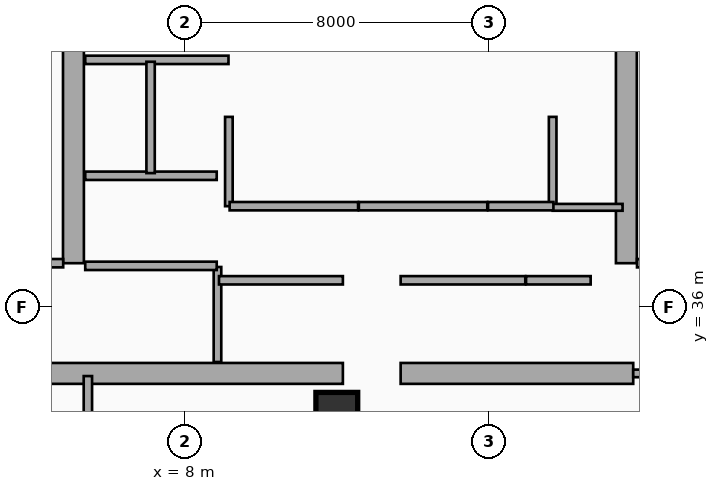
"""IFC4 building model, lengths in metres.
Left out: names, types, materials, properties, quantities, classifications, styles, units other than length and angle.
Written with IfcOpenShell. Run it as: python <this file> out.ifc"""

import sys

from ifc_helpers import new_model, si_unit, direction, frame, frame_2d, origin, origin_2d, place, context, subcontext, project, spatial, rectangle, extrude, element, fill, save


model = new_model("IFC4")
c1 = context("Model", 3, precision=1e-05, world=origin(), true_north=direction((0.0, 1.0)))
c2 = subcontext(c1, "Body", "Model", "MODEL_VIEW")
j1 = project(units=[si_unit("LENGTHUNIT", "METRE"), si_unit("PLANEANGLEUNIT", "RADIAN")], contexts=[c1])
p1 = place(None, origin())
s1 = spatial("IfcSite", under=j1, at=p1, CompositionType="ELEMENT")
p2 = place(p1, origin())
s2 = spatial("IfcBuilding", under=s1, at=p2, CompositionType="ELEMENT")
p3 = place(p2, origin())
s3 = spatial("IfcBuildingStorey", under=s2, at=p3, CompositionType="ELEMENT", Elevation=0.0)
p4 = place(p3, frame((1.45, 34.25, 0.0), z_axis=(0.0, 0.0, 1.0), x_axis=(1.0, 0.0, 0.0)))
e1 = element("IfcWall", 1, at=p4, inside=s3, PredefinedType="SHEAR", context=c2, shape_type="SweptSolid", body=[
    extrude(rectangle(XDim=10.71, YDim=0.55, at=frame_2d((5.355, 0.0))), origin(), (0.0, 0.0, 1.0), 5.94),
])
p5 = place(p4, frame((7.25, 0.0, 0.0), z_axis=(0.0, 0.0, 1.0), x_axis=(-1.0, 0.0, 0.0)))
e2 = element("IfcOpeningElement", 2, at=p5, cuts=e1, PredefinedType="OPENING", context=c2, shape_type="SweptSolid", body=[
    extrude(rectangle(XDim=1.1, YDim=2.15, at=frame_2d((0.55, 1.075))), frame((0.0, 0.285, 0.0), z_axis=(0.0, -1.0, 0.0), x_axis=(1.0, 0.0, 0.0)), (0.0, 0.0, 1.0), 0.57),
])
p6 = place(p3, frame((13.68, 34.25, 0.0), z_axis=(0.0, 0.0, 1.0), x_axis=(1.0, 0.0, 0.0)))
e3 = element("IfcWall", 3, at=p6, inside=s3, PredefinedType="SHEAR", context=c2, shape_type="SweptSolid", body=[
    extrude(rectangle(XDim=6.12, YDim=0.55, at=frame_2d((3.06, 0.0))), origin(), (0.0, 0.0, 1.0), 5.94),
])
for number, where, z_axis, x_axis in (
    (4, (5.07, 37.15, 0.0), (0.0, 0.0, 1.0), (0.0, 1.0, 0.0)),
    (5, (19.62, 37.15, 0.0), (0.0, 0.0, 1.0), (0.0, 1.0, 0.0)),
):
    element("IfcWall", number, at=place(p3, frame(where, z_axis=z_axis, x_axis=x_axis)), inside=s3, PredefinedType="SHEAR", context=c2, shape_type="SweptSolid", body=[
        extrude(rectangle(XDim=7.89, YDim=0.55, at=frame_2d((3.945, 0.0))), origin(), (0.0, 0.0, 1.0), 5.94),
    ])
p7 = place(p3, frame((12.0, 33.2, 0.0), z_axis=(0.0, 0.0, 1.0), x_axis=(1.0, 0.0, 0.0)))
e6 = element("IfcColumn", 6, at=p7, inside=s3, PredefinedType="COLUMN", context=c2, shape_type="SweptSolid", body=[
    extrude(rectangle(XDim=1.1, YDim=1.1, at=origin_2d()), origin(), (0.0, 0.0, 1.0), 5.94),
])
p8 = place(p3, frame((1.65, 37.15, 0.0), z_axis=(0.0, 0.0, 1.0), x_axis=(1.0, 0.0, 0.0)))
e7 = element("IfcWall", 7, at=p8, inside=s3, PredefinedType="PARTITIONING", context=c2, shape_type="SweptSolid", body=[
    extrude(rectangle(XDim=3.15, YDim=0.22, at=frame_2d((1.575, 0.0))), origin(), (0.0, 0.0, 1.0), 5.62),
])
p9 = place(p8, frame((2.05, 0.0, 0.0), z_axis=(0.0, 0.0, 1.0), x_axis=(-1.0, 0.0, 0.0)))
e8 = element("IfcOpeningElement", 8, at=p9, cuts=e7, PredefinedType="OPENING", context=c2, shape_type="SweptSolid", body=[
    extrude(rectangle(XDim=1.05, YDim=2.15, at=frame_2d((0.525, 1.075))), frame((0.0, 0.12, 0.0), z_axis=(0.0, -1.0, 0.0), x_axis=(1.0, 0.0, 0.0)), (0.0, 0.0, 1.0), 0.24),
])
p10 = place(p3, frame((8.86, 34.55, 0.0), z_axis=(0.0, 0.0, 1.0), x_axis=(0.0, 1.0, 0.0)))
e9 = element("IfcWall", 9, at=p10, inside=s3, PredefinedType="PARTITIONING", context=c2, shape_type="SweptSolid", body=[
    extrude(rectangle(XDim=2.5, YDim=0.2, at=frame_2d((1.25, 0.0))), origin(), (0.0, 0.0, 1.0), 5.62),
])
p11 = place(p3, frame((19.9, 37.15, 0.0), z_axis=(0.0, 0.0, 1.0), x_axis=(1.0, 0.0, 0.0)))
e10 = element("IfcWall", 10, at=p11, inside=s3, PredefinedType="PARTITIONING", context=c2, shape_type="SweptSolid", body=[
    extrude(rectangle(XDim=3.15, YDim=0.22, at=frame_2d((1.575, 0.0))), origin(), (0.0, 0.0, 1.0), 5.62),
])
p12 = place(p11, frame((2.05, 0.0, 0.0), z_axis=(0.0, 0.0, 1.0), x_axis=(-1.0, 0.0, 0.0)))
e11 = element("IfcOpeningElement", 11, at=p12, cuts=e10, PredefinedType="OPENING", context=c2, shape_type="SweptSolid", body=[
    extrude(rectangle(XDim=1.05, YDim=2.15, at=frame_2d((0.525, 1.075))), frame((0.0, 0.12, 0.0), z_axis=(0.0, -1.0, 0.0), x_axis=(1.0, 0.0, 0.0)), (0.0, 0.0, 1.0), 0.24),
])
p13 = place(p3, frame((19.8, 34.25, 0.0), z_axis=(0.0, 0.0, 1.0), x_axis=(1.0, 0.0, 0.0)))
e12 = element("IfcWall", 12, at=p13, inside=s3, PredefinedType="PARTITIONING", context=c2, shape_type="SweptSolid", body=[
    extrude(rectangle(XDim=3.25, YDim=0.2, at=frame_2d((1.625, 0.0))), origin(), (0.0, 0.0, 1.0), 5.62),
])
p14 = place(p13, frame((2.15, 0.0, 0.0), z_axis=(0.0, 0.0, 1.0), x_axis=(-1.0, 0.0, 0.0)))
e13 = element("IfcOpeningElement", 13, at=p14, cuts=e12, PredefinedType="OPENING", context=c2, shape_type="SweptSolid", body=[
    extrude(rectangle(XDim=1.1, YDim=2.15, at=frame_2d((0.55, 1.075))), frame((0.0, 0.11, 0.0), z_axis=(0.0, -1.0, 0.0), x_axis=(1.0, 0.0, 0.0)), (0.0, 0.0, 1.0), 0.22),
])
p15 = place(p3, frame((5.38, 37.08, 0.0), z_axis=(0.0, 0.0, 1.0), x_axis=(1.0, 0.0, 0.0)))
e14 = element("IfcWall", 14, at=p15, inside=s3, PredefinedType="PARTITIONING", context=c2, shape_type="SweptSolid", body=[
    extrude(rectangle(XDim=3.46, YDim=0.22, at=frame_2d((1.73, 0.0))), origin(), (0.0, 0.0, 1.0), 5.62),
])
p16 = place(p15, frame((1.55, 0.0, 0.0), z_axis=(0.0, 0.0, 1.0), x_axis=(-1.0, 0.0, 0.0)))
e15 = element("IfcOpeningElement", 15, at=p16, cuts=e14, PredefinedType="OPENING", context=c2, shape_type="SweptSolid", body=[
    extrude(rectangle(XDim=1.2, YDim=2.2, at=frame_2d((0.6, 1.1))), frame((0.0, 0.12, 0.0), z_axis=(0.0, -1.0, 0.0), x_axis=(1.0, 0.0, 0.0)), (0.0, 0.0, 1.0), 0.24),
])
p17 = place(p15, frame((3.22, 0.0, 0.0), z_axis=(0.0, 0.0, 1.0), x_axis=(-1.0, 0.0, 0.0)))
e16 = element("IfcOpeningElement", 16, at=p17, cuts=e14, PredefinedType="OPENING", context=c2, shape_type="SweptSolid", body=[
    extrude(rectangle(XDim=1.2, YDim=2.2, at=frame_2d((0.6, 1.1))), frame((0.0, 0.12, 0.0), z_axis=(0.0, -1.0, 0.0), x_axis=(1.0, 0.0, 0.0)), (0.0, 0.0, 1.0), 0.24),
])
p18 = place(p3, frame((5.38, 39.45, 0.0), z_axis=(0.0, 0.0, 1.0), x_axis=(1.0, 0.0, 0.0)))
e17 = element("IfcWall", 17, at=p18, inside=s3, PredefinedType="PARTITIONING", context=c2, shape_type="SweptSolid", body=[
    extrude(rectangle(XDim=3.46, YDim=0.22, at=frame_2d((1.73, 0.0))), origin(), (0.0, 0.0, 1.0), 5.62),
])
p19 = place(p3, frame((5.38, 42.5, 0.0), z_axis=(0.0, 0.0, 1.0), x_axis=(1.0, 0.0, 0.0)))
e18 = element("IfcWall", 18, at=p19, inside=s3, PredefinedType="PARTITIONING", context=c2, shape_type="SweptSolid", body=[
    extrude(rectangle(XDim=3.77, YDim=0.22, at=frame_2d((1.885, 0.0))), origin(), (0.0, 0.0, 1.0), 5.62),
])
p20 = place(p19, frame((1.75, 0.0, 0.0), z_axis=(0.0, 0.0, 1.0), x_axis=(-1.0, 0.0, 0.0)))
e19 = element("IfcOpeningElement", 19, at=p20, cuts=e18, PredefinedType="OPENING", context=c2, shape_type="SweptSolid", body=[
    extrude(rectangle(XDim=1.4, YDim=2.2, at=frame_2d((0.7, 1.1))), frame((0.0, 0.12, 0.0), z_axis=(0.0, -1.0, 0.0), x_axis=(1.0, 0.0, 0.0)), (0.0, 0.0, 1.0), 0.24),
])
p21 = place(p19, frame((3.53, 0.0, 0.0), z_axis=(0.0, 0.0, 1.0), x_axis=(-1.0, 0.0, 0.0)))
e20 = element("IfcOpeningElement", 20, at=p21, cuts=e18, PredefinedType="OPENING", context=c2, shape_type="SweptSolid", body=[
    extrude(rectangle(XDim=1.4, YDim=2.2, at=frame_2d((0.7, 1.1))), frame((0.0, 0.12, 0.0), z_axis=(0.0, -1.0, 0.0), x_axis=(1.0, 0.0, 0.0)), (0.0, 0.0, 1.0), 0.24),
])
p22 = place(p3, frame((7.1, 39.52, 0.0), z_axis=(0.0, 0.0, 1.0), x_axis=(0.0, 1.0, 0.0)))
e21 = element("IfcWall", 21, at=p22, inside=s3, PredefinedType="PARTITIONING", context=c2, shape_type="SweptSolid", body=[
    extrude(rectangle(XDim=2.93, YDim=0.22, at=frame_2d((1.465, 0.0))), origin(), (0.0, 0.0, 1.0), 5.62),
])
p23 = place(p22, frame((0.85, 0.0, 0.0)))
e22 = element("IfcOpeningElement", 22, at=p23, cuts=e21, PredefinedType="OPENING", context=c2, shape_type="SweptSolid", body=[
    extrude(rectangle(XDim=1.1, YDim=2.2, at=frame_2d((0.55, 1.1))), frame((0.0, 0.12, 0.0), z_axis=(0.0, -1.0, 0.0), x_axis=(1.0, 0.0, 0.0)), (0.0, 0.0, 1.0), 0.24),
])
p24 = place(p3, frame((5.45, 31.8, 0.0), z_axis=(0.0, 0.0, 1.0), x_axis=(0.0, 1.0, 0.0)))
e23 = element("IfcWall", 23, at=p24, inside=s3, PredefinedType="PARTITIONING", context=c2, shape_type="SweptSolid", body=[
    extrude(rectangle(XDim=2.38, YDim=0.22, at=frame_2d((1.19, 0.0))), origin(), (0.0, 0.0, 1.0), 5.62),
])
for number, where, z_axis, x_axis in (
    (24, (9.16, 38.65, 0.0), (0.0, 0.0, 1.0), (0.0, 1.0, 0.0)),
    (25, (17.68, 38.65, 0.0), (0.0, 0.0, 1.0), (0.0, 1.0, 0.0)),
):
    element("IfcWall", number, at=place(p3, frame(where, z_axis=z_axis, x_axis=x_axis)), inside=s3, PredefinedType="PARTITIONING", context=c2, shape_type="SweptSolid", body=[
        extrude(rectangle(XDim=2.35, YDim=0.2, at=frame_2d((1.175, 0.0))), origin(), (0.0, 0.0, 1.0), 5.62),
    ])
p25 = place(p3, frame((17.68, 38.62, 0.0), z_axis=(0.0, 0.0, 1.0), x_axis=(1.0, 0.0, 0.0)))
e26 = element("IfcWall", 26, at=p25, inside=s3, PredefinedType="PARTITIONING", context=c2, shape_type="SweptSolid", body=[
    extrude(rectangle(XDim=1.84, YDim=0.18, at=frame_2d((0.92, 0.0))), origin(), (0.0, 0.0, 1.0), 5.62),
])
p26 = place(p25, frame((0.24, 0.0, 0.0)))
e27 = element("IfcOpeningElement", 27, at=p26, cuts=e26, PredefinedType="OPENING", context=c2, shape_type="SweptSolid", body=[
    extrude(rectangle(XDim=0.92, YDim=2.1, at=frame_2d((0.46, 1.05))), frame((0.0, 0.1, 0.0), z_axis=(0.0, -1.0, 0.0), x_axis=(1.0, 0.0, 0.0)), (0.0, 0.0, 1.0), 0.2),
])
p27 = place(p3, frame((8.9, 36.7, 0.0), z_axis=(0.0, 0.0, 1.0), x_axis=(1.0, 0.0, 0.0)))
e28 = element("IfcWall", 28, at=p27, inside=s3, PredefinedType="PARTITIONING", context=c2, shape_type="SweptSolid", body=[
    extrude(rectangle(XDim=3.26, YDim=0.22, at=frame_2d((1.63, 0.0))), origin(), (0.0, 0.0, 1.0), 5.62),
])
p28 = place(p27, frame((0.26, 0.0, 0.0)))
e29 = element("IfcOpeningElement", 29, at=p28, cuts=e28, PredefinedType="OPENING", context=c2, shape_type="SweptSolid", body=[
    extrude(rectangle(XDim=1.1, YDim=2.2, at=frame_2d((0.55, 1.1))), frame((0.0, 0.12, 0.0), z_axis=(0.0, -1.0, 0.0), x_axis=(1.0, 0.0, 0.0)), (0.0, 0.0, 1.0), 0.24),
])
p29 = place(p27, frame((1.88, 0.0, 0.0)))
e30 = element("IfcOpeningElement", 30, at=p29, cuts=e28, PredefinedType="OPENING", context=c2, shape_type="SweptSolid", body=[
    extrude(rectangle(XDim=1.1, YDim=2.2, at=frame_2d((0.55, 1.1))), frame((0.0, 0.12, 0.0), z_axis=(0.0, -1.0, 0.0), x_axis=(1.0, 0.0, 0.0)), (0.0, 0.0, 1.0), 0.24),
])
p30 = place(p3, frame((9.18, 38.65, 0.0), z_axis=(0.0, 0.0, 1.0), x_axis=(1.0, 0.0, 0.0)))
e31 = element("IfcWall", 31, at=p30, inside=s3, PredefinedType="PARTITIONING", context=c2, shape_type="SweptSolid", body=[
    extrude(rectangle(XDim=3.38, YDim=0.22, at=frame_2d((1.69, 0.0))), origin(), (0.0, 0.0, 1.0), 5.62),
])
p31 = place(p30, frame((0.3, 0.0, 0.0)))
e32 = element("IfcOpeningElement", 32, at=p31, cuts=e31, PredefinedType="OPENING", context=c2, shape_type="SweptSolid", body=[
    extrude(rectangle(XDim=1.1, YDim=2.2, at=frame_2d((0.55, 1.1))), frame((0.0, 0.12, 0.0), z_axis=(0.0, -1.0, 0.0), x_axis=(1.0, 0.0, 0.0)), (0.0, 0.0, 1.0), 0.24),
])
p32 = place(p30, frame((1.95, 0.0, 0.0)))
e33 = element("IfcOpeningElement", 33, at=p32, cuts=e31, PredefinedType="OPENING", context=c2, shape_type="SweptSolid", body=[
    extrude(rectangle(XDim=1.1, YDim=2.2, at=frame_2d((0.55, 1.1))), frame((0.0, 0.12, 0.0), z_axis=(0.0, -1.0, 0.0), x_axis=(1.0, 0.0, 0.0)), (0.0, 0.0, 1.0), 0.24),
])
p33 = place(p3, frame((13.68, 36.7, 0.0), z_axis=(0.0, 0.0, 1.0), x_axis=(1.0, 0.0, 0.0)))
e34 = element("IfcWall", 34, at=p33, inside=s3, PredefinedType="PARTITIONING", context=c2, shape_type="SweptSolid", body=[
    extrude(rectangle(XDim=3.28, YDim=0.22, at=frame_2d((1.64, 0.0))), origin(), (0.0, 0.0, 1.0), 5.62),
])
p34 = place(p33, frame((0.28, 0.0, 0.0)))
e35 = element("IfcOpeningElement", 35, at=p34, cuts=e34, PredefinedType="OPENING", context=c2, shape_type="SweptSolid", body=[
    extrude(rectangle(XDim=1.1, YDim=2.2, at=frame_2d((0.55, 1.1))), frame((0.0, 0.12, 0.0), z_axis=(0.0, -1.0, 0.0), x_axis=(1.0, 0.0, 0.0)), (0.0, 0.0, 1.0), 0.24),
])
p35 = place(p33, frame((1.9, 0.0, 0.0)))
e36 = element("IfcOpeningElement", 36, at=p35, cuts=e34, PredefinedType="OPENING", context=c2, shape_type="SweptSolid", body=[
    extrude(rectangle(XDim=1.1, YDim=2.2, at=frame_2d((0.55, 1.1))), frame((0.0, 0.12, 0.0), z_axis=(0.0, -1.0, 0.0), x_axis=(1.0, 0.0, 0.0)), (0.0, 0.0, 1.0), 0.24),
])
p36 = place(p3, frame((12.58, 38.65, 0.0), z_axis=(0.0, 0.0, 1.0), x_axis=(1.0, 0.0, 0.0)))
e37 = element("IfcWall", 37, at=p36, inside=s3, PredefinedType="PARTITIONING", context=c2, shape_type="SweptSolid", body=[
    extrude(rectangle(XDim=3.38, YDim=0.22, at=frame_2d((1.69, 0.0))), origin(), (0.0, 0.0, 1.0), 5.62),
])
p37 = place(p36, frame((0.3, 0.0, 0.0)))
e38 = element("IfcOpeningElement", 38, at=p37, cuts=e37, PredefinedType="OPENING", context=c2, shape_type="SweptSolid", body=[
    extrude(rectangle(XDim=1.1, YDim=2.2, at=frame_2d((0.55, 1.1))), frame((0.0, 0.12, 0.0), z_axis=(0.0, -1.0, 0.0), x_axis=(1.0, 0.0, 0.0)), (0.0, 0.0, 1.0), 0.24),
])
p38 = place(p36, frame((1.95, 0.0, 0.0)))
e39 = element("IfcOpeningElement", 39, at=p38, cuts=e37, PredefinedType="OPENING", context=c2, shape_type="SweptSolid", body=[
    extrude(rectangle(XDim=1.1, YDim=2.2, at=frame_2d((0.55, 1.1))), frame((0.0, 0.12, 0.0), z_axis=(0.0, -1.0, 0.0), x_axis=(1.0, 0.0, 0.0)), (0.0, 0.0, 1.0), 0.24),
])
p39 = place(p3, frame((16.98, 36.7, 0.0), z_axis=(0.0, 0.0, 1.0), x_axis=(1.0, 0.0, 0.0)))
e40 = element("IfcWall", 40, at=p39, inside=s3, PredefinedType="PARTITIONING", context=c2, shape_type="SweptSolid", body=[
    extrude(rectangle(XDim=1.7, YDim=0.22, at=frame_2d((0.85, 0.0))), origin(), (0.0, 0.0, 1.0), 5.62),
])
p40 = place(p39, frame((0.3, 0.0, 0.0)))
e41 = element("IfcOpeningElement", 41, at=p40, cuts=e40, PredefinedType="OPENING", context=c2, shape_type="SweptSolid", body=[
    extrude(rectangle(XDim=1.1, YDim=2.2, at=frame_2d((0.55, 1.1))), frame((0.0, 0.12, 0.0), z_axis=(0.0, -1.0, 0.0), x_axis=(1.0, 0.0, 0.0)), (0.0, 0.0, 1.0), 0.24),
])
p41 = place(p3, frame((15.98, 38.65, 0.0), z_axis=(0.0, 0.0, 1.0), x_axis=(1.0, 0.0, 0.0)))
e42 = element("IfcWall", 42, at=p41, inside=s3, PredefinedType="PARTITIONING", context=c2, shape_type="SweptSolid", body=[
    extrude(rectangle(XDim=1.72, YDim=0.22, at=frame_2d((0.86, 0.0))), origin(), (0.0, 0.0, 1.0), 5.62),
])
p42 = place(p41, frame((0.3, 0.0, 0.0)))
e43 = element("IfcOpeningElement", 43, at=p42, cuts=e42, PredefinedType="OPENING", context=c2, shape_type="SweptSolid", body=[
    extrude(rectangle(XDim=1.1, YDim=2.2, at=frame_2d((0.55, 1.1))), frame((0.0, 0.12, 0.0), z_axis=(0.0, -1.0, 0.0), x_axis=(1.0, 0.0, 0.0)), (0.0, 0.0, 1.0), 0.24),
])
p43 = place(p5, origin())
e44 = element("IfcDoor", 44, at=p43, inside=s3, OperationType="SINGLE_SWING_LEFT", PredefinedType="DOOR", context=c2, shape_type="SweptSolid", body=[
    extrude(rectangle(XDim=1.1, YDim=2.15, at=frame_2d((0.55, 1.075))), frame((0.0, 0.025, 0.0), z_axis=(0.0, -1.0, 0.0), x_axis=(1.0, 0.0, 0.0)), (0.0, 0.0, 1.0), 0.05),
])
fill(e2, e44)
p44 = place(p16, origin())
e45 = element("IfcDoor", 45, at=p44, inside=s3, OperationType="SLIDING_TO_RIGHT", PredefinedType="DOOR", context=c2, shape_type="SweptSolid", body=[
    extrude(rectangle(XDim=1.2, YDim=2.2, at=frame_2d((0.6, 1.1))), frame((0.0, 0.025, 0.0), z_axis=(0.0, -1.0, 0.0), x_axis=(1.0, 0.0, 0.0)), (0.0, 0.0, 1.0), 0.05),
])
fill(e15, e45)
p45 = place(p17, origin())
e46 = element("IfcDoor", 46, at=p45, inside=s3, OperationType="SLIDING_TO_RIGHT", PredefinedType="DOOR", context=c2, shape_type="SweptSolid", body=[
    extrude(rectangle(XDim=1.2, YDim=2.2, at=frame_2d((0.6, 1.1))), frame((0.0, 0.025, 0.0), z_axis=(0.0, -1.0, 0.0), x_axis=(1.0, 0.0, 0.0)), (0.0, 0.0, 1.0), 0.05),
])
fill(e16, e46)
p46 = place(p20, origin())
e47 = element("IfcDoor", 47, at=p46, inside=s3, OperationType="SLIDING_TO_LEFT", PredefinedType="DOOR", context=c2, shape_type="SweptSolid", body=[
    extrude(rectangle(XDim=1.4, YDim=2.2, at=frame_2d((0.7, 1.1))), frame((0.0, 0.025, 0.0), z_axis=(0.0, -1.0, 0.0), x_axis=(1.0, 0.0, 0.0)), (0.0, 0.0, 1.0), 0.05),
])
fill(e19, e47)
p47 = place(p21, origin())
e48 = element("IfcDoor", 48, at=p47, inside=s3, OperationType="SLIDING_TO_LEFT", PredefinedType="DOOR", context=c2, shape_type="SweptSolid", body=[
    extrude(rectangle(XDim=1.4, YDim=2.2, at=frame_2d((0.7, 1.1))), frame((0.0, 0.025, 0.0), z_axis=(0.0, -1.0, 0.0), x_axis=(1.0, 0.0, 0.0)), (0.0, 0.0, 1.0), 0.05),
])
fill(e20, e48)
p48 = place(p23, origin())
e49 = element("IfcDoor", 49, at=p48, inside=s3, OperationType="SLIDING_TO_LEFT", PredefinedType="DOOR", context=c2, shape_type="SweptSolid", body=[
    extrude(rectangle(XDim=1.1, YDim=2.2, at=frame_2d((0.55, 1.1))), frame((0.0, 0.025, 0.0), z_axis=(0.0, -1.0, 0.0), x_axis=(1.0, 0.0, 0.0)), (0.0, 0.0, 1.0), 0.05),
])
fill(e22, e49)
p49 = place(p26, origin())
e50 = element("IfcDoor", 50, at=p49, inside=s3, OperationType="SINGLE_SWING_RIGHT", PredefinedType="DOOR", context=c2, shape_type="SweptSolid", body=[
    extrude(rectangle(XDim=0.92, YDim=2.1, at=frame_2d((0.46, 1.05))), frame((0.0, 0.025, 0.0), z_axis=(0.0, -1.0, 0.0), x_axis=(1.0, 0.0, 0.0)), (0.0, 0.0, 1.0), 0.05),
])
fill(e27, e50)
p50 = place(p28, origin())
e51 = element("IfcDoor", 51, at=p50, inside=s3, OperationType="SLIDING_TO_LEFT", PredefinedType="DOOR", context=c2, shape_type="SweptSolid", body=[
    extrude(rectangle(XDim=1.1, YDim=2.2, at=frame_2d((0.55, 1.1))), frame((0.0, 0.025, 0.0), z_axis=(0.0, -1.0, 0.0), x_axis=(1.0, 0.0, 0.0)), (0.0, 0.0, 1.0), 0.05),
])
fill(e29, e51)
p51 = place(p29, origin())
e52 = element("IfcDoor", 52, at=p51, inside=s3, OperationType="SLIDING_TO_LEFT", PredefinedType="DOOR", context=c2, shape_type="SweptSolid", body=[
    extrude(rectangle(XDim=1.1, YDim=2.2, at=frame_2d((0.55, 1.1))), frame((0.0, 0.025, 0.0), z_axis=(0.0, -1.0, 0.0), x_axis=(1.0, 0.0, 0.0)), (0.0, 0.0, 1.0), 0.05),
])
fill(e30, e52)
p52 = place(p31, origin())
e53 = element("IfcDoor", 53, at=p52, inside=s3, OperationType="SLIDING_TO_LEFT", PredefinedType="DOOR", context=c2, shape_type="SweptSolid", body=[
    extrude(rectangle(XDim=1.1, YDim=2.2, at=frame_2d((0.55, 1.1))), frame((0.0, 0.025, 0.0), z_axis=(0.0, -1.0, 0.0), x_axis=(1.0, 0.0, 0.0)), (0.0, 0.0, 1.0), 0.05),
])
fill(e32, e53)
p53 = place(p32, origin())
e54 = element("IfcDoor", 54, at=p53, inside=s3, OperationType="SLIDING_TO_LEFT", PredefinedType="DOOR", context=c2, shape_type="SweptSolid", body=[
    extrude(rectangle(XDim=1.1, YDim=2.2, at=frame_2d((0.55, 1.1))), frame((0.0, 0.025, 0.0), z_axis=(0.0, -1.0, 0.0), x_axis=(1.0, 0.0, 0.0)), (0.0, 0.0, 1.0), 0.05),
])
fill(e33, e54)
p54 = place(p34, origin())
e55 = element("IfcDoor", 55, at=p54, inside=s3, OperationType="SLIDING_TO_RIGHT", PredefinedType="DOOR", context=c2, shape_type="SweptSolid", body=[
    extrude(rectangle(XDim=1.1, YDim=2.2, at=frame_2d((0.55, 1.1))), frame((0.0, 0.025, 0.0), z_axis=(0.0, -1.0, 0.0), x_axis=(1.0, 0.0, 0.0)), (0.0, 0.0, 1.0), 0.05),
])
fill(e35, e55)
p55 = place(p35, origin())
e56 = element("IfcDoor", 56, at=p55, inside=s3, OperationType="SLIDING_TO_RIGHT", PredefinedType="DOOR", context=c2, shape_type="SweptSolid", body=[
    extrude(rectangle(XDim=1.1, YDim=2.2, at=frame_2d((0.55, 1.1))), frame((0.0, 0.025, 0.0), z_axis=(0.0, -1.0, 0.0), x_axis=(1.0, 0.0, 0.0)), (0.0, 0.0, 1.0), 0.05),
])
fill(e36, e56)
p56 = place(p37, origin())
e57 = element("IfcDoor", 57, at=p56, inside=s3, OperationType="SLIDING_TO_RIGHT", PredefinedType="DOOR", context=c2, shape_type="SweptSolid", body=[
    extrude(rectangle(XDim=1.1, YDim=2.2, at=frame_2d((0.55, 1.1))), frame((0.0, 0.025, 0.0), z_axis=(0.0, -1.0, 0.0), x_axis=(1.0, 0.0, 0.0)), (0.0, 0.0, 1.0), 0.05),
])
fill(e38, e57)
p57 = place(p38, origin())
e58 = element("IfcDoor", 58, at=p57, inside=s3, OperationType="SLIDING_TO_RIGHT", PredefinedType="DOOR", context=c2, shape_type="SweptSolid", body=[
    extrude(rectangle(XDim=1.1, YDim=2.2, at=frame_2d((0.55, 1.1))), frame((0.0, 0.025, 0.0), z_axis=(0.0, -1.0, 0.0), x_axis=(1.0, 0.0, 0.0)), (0.0, 0.0, 1.0), 0.05),
])
fill(e39, e58)
p58 = place(p40, origin())
e59 = element("IfcDoor", 59, at=p58, inside=s3, OperationType="SLIDING_TO_LEFT", PredefinedType="DOOR", context=c2, shape_type="SweptSolid", body=[
    extrude(rectangle(XDim=1.1, YDim=2.2, at=frame_2d((0.55, 1.1))), frame((0.0, 0.025, 0.0), z_axis=(0.0, -1.0, 0.0), x_axis=(1.0, 0.0, 0.0)), (0.0, 0.0, 1.0), 0.05),
])
fill(e41, e59)
p59 = place(p42, origin())
e60 = element("IfcDoor", 60, at=p59, inside=s3, OperationType="SLIDING_TO_LEFT", PredefinedType="DOOR", context=c2, shape_type="SweptSolid", body=[
    extrude(rectangle(XDim=1.1, YDim=2.2, at=frame_2d((0.55, 1.1))), frame((0.0, 0.025, 0.0), z_axis=(0.0, -1.0, 0.0), x_axis=(1.0, 0.0, 0.0)), (0.0, 0.0, 1.0), 0.05),
])
fill(e43, e60)
save(model, sys.argv[1])
